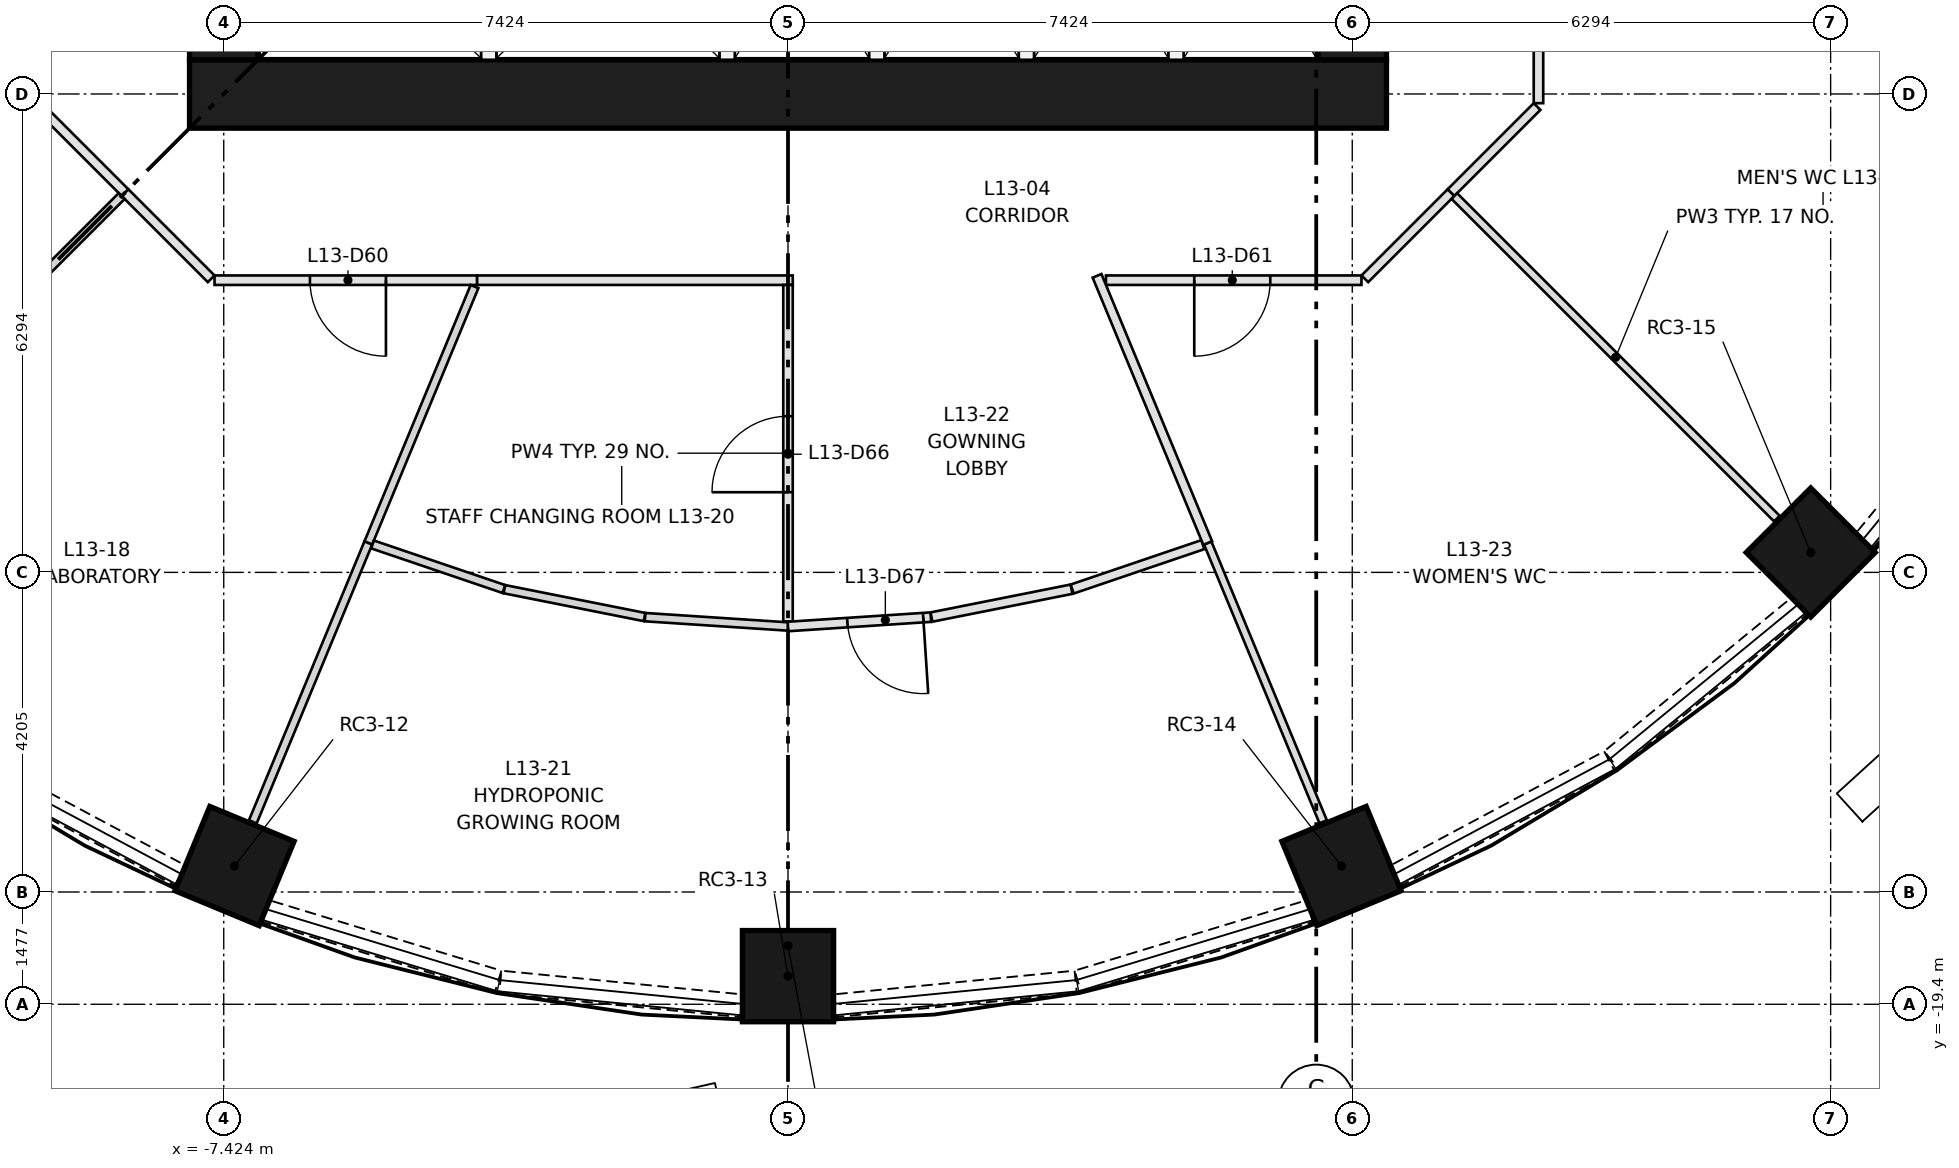
"""IFC4 building model, lengths in metres.
Left out: names, types, materials, properties, quantities, classifications, styles, units other than length and angle.
Written with IfcOpenShell. Run it as: python <this file> out.ifc"""

import sys

from ifc_helpers import new_model, si_unit, direction, frame, frame_2d, origin, origin_2d, place, context, subcontext, project, spatial, rectangle, extrude, element, fill, save


model = new_model("IFC4")
c1 = context("Model", 3, precision=1e-05, world=origin(), true_north=direction((0.0, 1.0)))
c2 = subcontext(c1, "Body", "Model", "MODEL_VIEW")
j1 = project(units=[si_unit("LENGTHUNIT", "METRE"), si_unit("PLANEANGLEUNIT", "RADIAN")], contexts=[c1])
p1 = place(None, origin())
s1 = spatial("IfcSite", under=j1, at=p1, CompositionType="ELEMENT")
p2 = place(p1, origin())
s2 = spatial("IfcBuilding", under=s1, at=p2, CompositionType="ELEMENT")
p3 = place(p2, frame((0.0, 0.0, 51.75)))
s3 = spatial("IfcBuildingStorey", under=s2, at=p3, CompositionType="ELEMENT", Elevation=51.75)
for number, where, z_axis, x_axis in (
    (1, (-7.282, -17.582, 0.0), (0.0, 0.0, 1.0), (-0.383, -0.924, 0.0)),
    (2, (0.0, -19.03, 0.0), (0.0, 0.0, 1.0), (0.0, -1.0, 0.0)),
    (3, (7.282, -17.582, 0.0), (0.0, 0.0, 1.0), (0.383, -0.924, 0.0)),
    (4, (13.456, -13.456, 0.0), (0.0, 0.0, 1.0), (0.707, -0.707, 0.0)),
):
    element("IfcColumn", number, at=place(p3, frame(where, z_axis=z_axis, x_axis=x_axis)), inside=s3, PredefinedType="COLUMN", context=c2, shape_type="SweptSolid", body=[
        extrude(rectangle(XDim=1.2, YDim=1.2, at=origin_2d()), origin(), (0.0, 0.0, 1.0), 3.65),
    ])
p4 = place(p3, frame((-7.874, -7.424, 0.0), z_axis=(0.0, 0.0, 1.0), x_axis=(1.0, 0.0, 0.0)))
e5 = element("IfcWall", 5, at=p4, inside=s3, PredefinedType="SHEAR", context=c2, shape_type="SweptSolid", body=[
    extrude(rectangle(XDim=15.748, YDim=0.9, at=frame_2d((7.874, 0.0))), origin(), (0.0, 0.0, 1.0), 3.65),
])
p5 = place(p3, frame((-7.424, -6.974, 0.0), z_axis=(0.0, 0.0, 1.0), x_axis=(0.0, 1.0, 0.0)))
e6 = element("IfcWall", 6, at=p5, inside=s3, PredefinedType="SHEAR", context=c2, shape_type="SweptSolid", body=[
    extrude(rectangle(XDim=13.948, YDim=0.9, at=frame_2d((6.974, 0.0))), origin(), (0.0, 0.0, 1.0), 3.65),
])
p6 = place(p5, frame((6.474, 0.0, 0.0)))
e7 = element("IfcOpeningElement", 7, at=p6, cuts=e6, PredefinedType="OPENING", context=c2, shape_type="SweptSolid", body=[
    extrude(rectangle(XDim=1.0, YDim=2.1, at=frame_2d((0.5, 1.05))), frame((0.0, 0.46, 0.0), z_axis=(0.0, -1.0, 0.0), x_axis=(1.0, 0.0, 0.0)), (0.0, 0.0, 1.0), 0.92),
])
p7 = place(p5, frame((3.35, 0.0, 0.0)))
e8 = element("IfcOpeningElement", 8, at=p7, cuts=e6, PredefinedType="OPENING", context=c2, shape_type="SweptSolid", body=[
    extrude(rectangle(XDim=1.8, YDim=2.1, at=frame_2d((0.9, 1.05))), frame((0.0, 0.46, 0.0), z_axis=(0.0, -1.0, 0.0), x_axis=(1.0, 0.0, 0.0)), (0.0, 0.0, 1.0), 0.92),
])
p8 = place(p5, frame((8.799, 0.0, 0.0)))
e9 = element("IfcOpeningElement", 9, at=p8, cuts=e6, PredefinedType="OPENING", context=c2, shape_type="SweptSolid", body=[
    extrude(rectangle(XDim=1.8, YDim=2.1, at=frame_2d((0.9, 1.05))), frame((0.0, 0.46, 0.0), z_axis=(0.0, -1.0, 0.0), x_axis=(1.0, 0.0, 0.0)), (0.0, 0.0, 1.0), 0.92),
])
p9 = place(p5, frame((11.974, 0.0, 0.0)))
e10 = element("IfcOpeningElement", 10, at=p9, cuts=e6, PredefinedType="OPENING", context=c2, shape_type="SweptSolid", body=[
    extrude(rectangle(XDim=1.0, YDim=2.1, at=frame_2d((0.5, 1.05))), frame((0.0, 0.46, 0.0), z_axis=(0.0, -1.0, 0.0), x_axis=(1.0, 0.0, 0.0)), (0.0, 0.0, 1.0), 0.92),
])
p10 = place(p3, frame((7.424, -6.974, 0.0), z_axis=(0.0, 0.0, 1.0), x_axis=(0.0, 1.0, 0.0)))
e11 = element("IfcWall", 11, at=p10, inside=s3, PredefinedType="SHEAR", context=c2, shape_type="SweptSolid", body=[
    extrude(rectangle(XDim=13.948, YDim=0.9, at=frame_2d((6.974, 0.0))), origin(), (0.0, 0.0, 1.0), 3.65),
])
p11 = place(p10, frame((6.474, 0.0, 0.0)))
e12 = element("IfcOpeningElement", 12, at=p11, cuts=e11, PredefinedType="OPENING", context=c2, shape_type="SweptSolid", body=[
    extrude(rectangle(XDim=1.0, YDim=2.1, at=frame_2d((0.5, 1.05))), frame((0.0, 0.46, 0.0), z_axis=(0.0, -1.0, 0.0), x_axis=(1.0, 0.0, 0.0)), (0.0, 0.0, 1.0), 0.92),
])
p12 = place(p10, frame((3.35, 0.0, 0.0)))
e13 = element("IfcOpeningElement", 13, at=p12, cuts=e11, PredefinedType="OPENING", context=c2, shape_type="SweptSolid", body=[
    extrude(rectangle(XDim=1.8, YDim=2.1, at=frame_2d((0.9, 1.05))), frame((0.0, 0.46, 0.0), z_axis=(0.0, -1.0, 0.0), x_axis=(1.0, 0.0, 0.0)), (0.0, 0.0, 1.0), 0.92),
])
p13 = place(p10, frame((8.799, 0.0, 0.0)))
e14 = element("IfcOpeningElement", 14, at=p13, cuts=e11, PredefinedType="OPENING", context=c2, shape_type="SweptSolid", body=[
    extrude(rectangle(XDim=1.8, YDim=2.1, at=frame_2d((0.9, 1.05))), frame((0.0, 0.46, 0.0), z_axis=(0.0, -1.0, 0.0), x_axis=(1.0, 0.0, 0.0)), (0.0, 0.0, 1.0), 0.92),
])
for number, where, z_axis, x_axis in (
    (15, (-3.937, -6.974, 0.0), (0.0, 0.0, 1.0), (0.0, 1.0, 0.0)),
    (16, (-0.8, -6.974, 0.0), (0.0, 0.0, 1.0), (0.0, 1.0, 0.0)),
    (17, (1.168, -6.974, 0.0), (0.0, 0.0, 1.0), (0.0, 1.0, 0.0)),
    (18, (3.137, -6.974, 0.0), (0.0, 0.0, 1.0), (0.0, 1.0, 0.0)),
    (19, (5.105, -6.974, 0.0), (0.0, 0.0, 1.0), (0.0, 1.0, 0.0)),
):
    element("IfcWall", number, at=place(p3, frame(where, z_axis=z_axis, x_axis=x_axis)), inside=s3, PredefinedType="PARTITIONING", context=c2, shape_type="SweptSolid", body=[
        extrude(rectangle(XDim=2.8, YDim=0.2, at=frame_2d((1.4, 0.0))), origin(), (0.0, 0.0, 1.0), 3.3),
    ])
p14 = place(p3, frame((-10.809, -16.204, 0.0), z_axis=(0.0, 0.0, 1.0), x_axis=(0.881994263934, -0.471260138764, 0.0)))
e20 = element("IfcWall", 20, at=p14, inside=s3, PredefinedType="SOLIDWALL", context=c2, shape_type="SweptSolid", body=[
    extrude(rectangle(XDim=3.187, YDim=0.3, at=frame_2d((1.593, 0.0))), origin(), (0.0, 0.0, 1.0), 0.9),
])
p15 = place(p3, frame((-6.865, -18.175, 0.0), z_axis=(0.0, 0.0, 1.0), x_axis=(0.956849017819, -0.290585541792, 0.0)))
e21 = element("IfcWall", 21, at=p15, inside=s3, PredefinedType="SOLIDWALL", context=c2, shape_type="SweptSolid", body=[
    extrude(rectangle(XDim=3.188, YDim=0.3, at=frame_2d((1.594, 0.0))), origin(), (0.0, 0.0, 1.0), 0.9),
])
for number, where, z_axis, x_axis in (
    (22, (-3.785, -19.107, 0.0), (0.0, 0.0, 1.0), (0.995, -0.098, 0.0)),
    (23, (0.613, -19.419, 0.0), (0.0, 0.0, 1.0), (0.995, 0.098, 0.0)),
):
    element("IfcWall", number, at=place(p3, frame(where, z_axis=z_axis, x_axis=x_axis)), inside=s3, PredefinedType="SOLIDWALL", context=c2, shape_type="SweptSolid", body=[
        extrude(rectangle(XDim=3.188, YDim=0.3, at=frame_2d((1.594, 0.0))), origin(), (0.0, 0.0, 1.0), 0.9),
    ])
p16 = place(p3, frame((3.814, -19.102, 0.0), z_axis=(0.0, 0.0, 1.0), x_axis=(0.956849017819, 0.290585541792, 0.0)))
e24 = element("IfcWall", 24, at=p16, inside=s3, PredefinedType="SOLIDWALL", context=c2, shape_type="SweptSolid", body=[
    extrude(rectangle(XDim=3.188, YDim=0.3, at=frame_2d((1.594, 0.0))), origin(), (0.0, 0.0, 1.0), 0.9),
])
p17 = place(p3, frame((7.998, -17.706, 0.0), z_axis=(0.0, 0.0, 1.0), x_axis=(0.881994263934, 0.471260138764, 0.0)))
e25 = element("IfcWall", 25, at=p17, inside=s3, PredefinedType="SOLIDWALL", context=c2, shape_type="SweptSolid", body=[
    extrude(rectangle(XDim=3.187, YDim=0.3, at=frame_2d((1.593, 0.0))), origin(), (0.0, 0.0, 1.0), 0.9),
])
for number, where, z_axis, x_axis in (
    (26, (10.833, -16.188, 0.0), (0.0, 0.0, 1.0), (0.773, 0.634, 0.0)),
    (27, (14.166, -13.298, 0.0), (0.0, 0.0, 1.0), (0.634, 0.773, 0.0)),
):
    element("IfcWall", number, at=place(p3, frame(where, z_axis=z_axis, x_axis=x_axis)), inside=s3, PredefinedType="SOLIDWALL", context=c2, shape_type="SweptSolid", body=[
        extrude(rectangle(XDim=3.188, YDim=0.3, at=frame_2d((1.594, 0.0))), origin(), (0.0, 0.0, 1.0), 0.9),
    ])
p18 = place(p3, frame((9.856, -7.589, 0.0), z_axis=(0.0, 0.0, 1.0), x_axis=(-0.70718294931, -0.707030604857, 0.0)))
e28 = element("IfcWall", 28, at=p18, inside=s3, PredefinedType="PARTITIONING", context=c2, shape_type="SweptSolid", body=[
    extrude(rectangle(XDim=1.603, YDim=0.125, at=frame_2d((0.801, 0.0))), origin(), (0.0, 0.0, 1.0), 3.3),
])
p19 = place(p3, frame((9.874, -4.09, 0.0), z_axis=(0.0, 0.0, 1.0), x_axis=(0.0, -1.0, 0.0)))
e29 = element("IfcWall", 29, at=p19, inside=s3, PredefinedType="PARTITIONING", context=c2, shape_type="SweptSolid", body=[
    extrude(rectangle(XDim=3.455, YDim=0.125, at=frame_2d((1.728, 0.0))), origin(), (0.0, 0.0, 1.0), 3.3),
])
p20 = place(p19, frame((1.2, 0.0, 0.0)))
e30 = element("IfcOpeningElement", 30, at=p20, cuts=e29, PredefinedType="OPENING", context=c2, shape_type="SweptSolid", body=[
    extrude(rectangle(XDim=1.0, YDim=2.1, at=frame_2d((0.5, 1.05))), frame((0.0, 0.073, 0.0), z_axis=(0.0, -1.0, 0.0), x_axis=(1.0, 0.0, 0.0)), (0.0, 0.0, 1.0), 0.145),
])
for number, where, z_axis, x_axis in (
    (31, (-8.722, -8.722, 0.0), (0.0, 0.0, 1.0), (-0.707, 0.707, 0.0)),
    (32, (-7.589, -9.856, 0.0), (0.0, 0.0, 1.0), (-0.707, 0.707, 0.0)),
):
    element("IfcWall", number, at=place(p3, frame(where, z_axis=z_axis, x_axis=x_axis)), inside=s3, PredefinedType="PARTITIONING", context=c2, shape_type="SweptSolid", body=[
        extrude(rectangle(XDim=1.603, YDim=0.125, at=frame_2d((0.801, 0.0))), origin(), (0.0, 0.0, 1.0), 3.3),
    ])
p21 = place(p3, frame((-4.09, -9.874, 0.0), z_axis=(0.0, 0.0, 1.0), x_axis=(-1.0, 0.0, 0.0)))
e33 = element("IfcWall", 33, at=p21, inside=s3, PredefinedType="PARTITIONING", context=c2, shape_type="SweptSolid", body=[
    extrude(rectangle(XDim=3.455, YDim=0.125, at=frame_2d((1.728, 0.0))), origin(), (0.0, 0.0, 1.0), 3.3),
])
p22 = place(p21, frame((1.2, 0.0, 0.0)))
e34 = element("IfcOpeningElement", 34, at=p22, cuts=e33, PredefinedType="OPENING", context=c2, shape_type="SweptSolid", body=[
    extrude(rectangle(XDim=1.0, YDim=2.1, at=frame_2d((0.5, 1.05))), frame((0.0, 0.073, 0.0), z_axis=(0.0, -1.0, 0.0), x_axis=(1.0, 0.0, 0.0)), (0.0, 0.0, 1.0), 0.145),
])
p23 = place(p3, frame((0.062, -9.874, 0.0), z_axis=(0.0, 0.0, 1.0), x_axis=(-1.0, 0.0, 0.0)))
e35 = element("IfcWall", 35, at=p23, inside=s3, PredefinedType="PARTITIONING", context=c2, shape_type="SweptSolid", body=[
    extrude(rectangle(XDim=4.152, YDim=0.125, at=frame_2d((2.076, 0.0))), origin(), (0.0, 0.0, 1.0), 3.3),
])
p24 = place(p3, frame((7.545, -9.874, 0.0), z_axis=(0.0, 0.0, 1.0), x_axis=(-1.0, 0.0, 0.0)))
e36 = element("IfcWall", 36, at=p24, inside=s3, PredefinedType="PARTITIONING", context=c2, shape_type="SweptSolid", body=[
    extrude(rectangle(XDim=3.362, YDim=0.125, at=frame_2d((1.681, 0.0))), origin(), (0.0, 0.0, 1.0), 3.3),
])
p25 = place(p24, frame((1.2, 0.0, 0.0)))
e37 = element("IfcOpeningElement", 37, at=p25, cuts=e36, PredefinedType="OPENING", context=c2, shape_type="SweptSolid", body=[
    extrude(rectangle(XDim=1.0, YDim=2.1, at=frame_2d((0.5, 1.05))), frame((0.0, 0.073, 0.0), z_axis=(0.0, -1.0, 0.0), x_axis=(1.0, 0.0, 0.0)), (0.0, 0.0, 1.0), 0.145),
])
p26 = place(p3, frame((8.722, -8.722, 0.0), z_axis=(0.0, 0.0, 1.0), x_axis=(-0.707030604857, -0.70718294931, 0.0)))
e38 = element("IfcWall", 38, at=p26, inside=s3, PredefinedType="PARTITIONING", context=c2, shape_type="SweptSolid", body=[
    extrude(rectangle(XDim=1.603, YDim=0.125, at=frame_2d((0.801, 0.0))), origin(), (0.0, 0.0, 1.0), 3.3),
])
p27 = place(p3, frame((17.0, -7.042, 0.0), z_axis=(0.0, 0.0, 1.0), x_axis=(-0.923870076355, 0.382706260748, 0.0)))
e39 = element("IfcWall", 39, at=p27, inside=s3, PredefinedType="PARTITIONING", context=c2, shape_type="SweptSolid", body=[
    extrude(rectangle(XDim=3.67, YDim=0.105, at=frame_2d((1.835, 0.0))), origin(), (0.0, 0.0, 1.0), 3.3),
])
p28 = place(p3, frame((-13.011, -13.011, 0.0), z_axis=(0.0, 0.0, 1.0), x_axis=(0.707106781187, 0.707106781187, 0.0)))
e40 = element("IfcWall", 40, at=p28, inside=s3, PredefinedType="PARTITIONING", context=c2, shape_type="SweptSolid", body=[
    extrude(rectangle(XDim=6.002, YDim=0.11, at=frame_2d((3.001, 0.0))), origin(), (0.0, 0.0, 1.0), 3.3),
])
p29 = place(p3, frame((-4.125, -9.958, 0.0), z_axis=(0.0, 0.0, 1.0), x_axis=(-0.382715874613, -0.923866093825, 0.0)))
e41 = element("IfcWall", 41, at=p29, inside=s3, PredefinedType="PARTITIONING", context=c2, shape_type="SweptSolid", body=[
    extrude(rectangle(XDim=3.652, YDim=0.11, at=frame_2d((1.826, 0.0))), origin(), (0.0, 0.0, 1.0), 3.3),
])
p30 = place(p3, frame((-5.522, -13.332, 0.0), z_axis=(0.0, 0.0, 1.0), x_axis=(-0.382675844596, -0.923882675432, 0.0)))
e42 = element("IfcWall", 42, at=p30, inside=s3, PredefinedType="PARTITIONING", context=c2, shape_type="SweptSolid", body=[
    extrude(rectangle(XDim=3.97, YDim=0.11, at=frame_2d((1.985, 0.0))), origin(), (0.0, 0.0, 1.0), 3.3),
])
p31 = place(p3, frame((-3.738, -13.937, 0.0), z_axis=(0.0, 0.0, 1.0), x_axis=(-0.94697070508, 0.321319908688, 0.0)))
e43 = element("IfcWall", 43, at=p31, inside=s3, PredefinedType="PARTITIONING", context=c2, shape_type="SweptSolid", body=[
    extrude(rectangle(XDim=1.825, YDim=0.11, at=frame_2d((0.913, 0.0))), origin(), (0.0, 0.0, 1.0), 3.3),
])
p32 = place(p3, frame((-1.887, -14.306, 0.0), z_axis=(0.0, 0.0, 1.0), x_axis=(-0.980774944963, 0.195142274593, 0.0)))
e44 = element("IfcWall", 44, at=p32, inside=s3, PredefinedType="PARTITIONING", context=c2, shape_type="SweptSolid", body=[
    extrude(rectangle(XDim=1.88, YDim=0.11, at=frame_2d((0.94, 0.0))), origin(), (0.0, 0.0, 1.0), 3.3),
])
p33 = place(p3, frame((0.0, -14.43, 0.0), z_axis=(0.0, 0.0, 1.0), x_axis=(-0.997856255434, 0.06544381935, 0.0)))
e45 = element("IfcWall", 45, at=p33, inside=s3, PredefinedType="PARTITIONING", context=c2, shape_type="SweptSolid", body=[
    extrude(rectangle(XDim=1.884, YDim=0.11, at=frame_2d((0.942, 0.0))), origin(), (0.0, 0.0, 1.0), 3.3),
])
p34 = place(p3, frame((0.0, -14.363, 0.0), z_axis=(0.0, 0.0, 1.0), x_axis=(0.0, 1.0, 0.0)))
e46 = element("IfcWall", 46, at=p34, inside=s3, PredefinedType="PARTITIONING", context=c2, shape_type="SweptSolid", body=[
    extrude(rectangle(XDim=4.427, YDim=0.125, at=frame_2d((2.213, 0.0))), origin(), (0.0, 0.0, 1.0), 3.3),
])
p35 = place(p34, frame((1.7, 0.0, 0.0)))
e47 = element("IfcOpeningElement", 47, at=p35, cuts=e46, PredefinedType="OPENING", context=c2, shape_type="SweptSolid", body=[
    extrude(rectangle(XDim=1.0, YDim=2.1, at=frame_2d((0.5, 1.05))), frame((0.0, 0.073, 0.0), z_axis=(0.0, -1.0, 0.0), x_axis=(1.0, 0.0, 0.0)), (0.0, 0.0, 1.0), 0.145),
])
p36 = place(p3, frame((1.879, -14.307, 0.0), z_axis=(0.0, 0.0, 1.0), x_axis=(-0.997863603838, -0.065331677882, 0.0)))
e48 = element("IfcWall", 48, at=p36, inside=s3, PredefinedType="PARTITIONING", context=c2, shape_type="SweptSolid", body=[
    extrude(rectangle(XDim=1.883, YDim=0.125, at=frame_2d((0.942, 0.0))), origin(), (0.0, 0.0, 1.0), 3.3),
])
p37 = place(p36, frame((0.1, 0.0, 0.0)))
e49 = element("IfcOpeningElement", 49, at=p37, cuts=e48, PredefinedType="OPENING", context=c2, shape_type="SweptSolid", body=[
    extrude(rectangle(XDim=1.0, YDim=2.1, at=frame_2d((0.5, 1.05))), frame((0.0, 0.073, 0.0), z_axis=(0.0, -1.0, 0.0), x_axis=(1.0, 0.0, 0.0)), (0.0, 0.0, 1.0), 0.145),
])
p38 = place(p3, frame((1.887, -14.306, 0.0), z_axis=(0.0, 0.0, 1.0), x_axis=(0.980804871908, 0.194991803011, 0.0)))
e50 = element("IfcWall", 50, at=p38, inside=s3, PredefinedType="PARTITIONING", context=c2, shape_type="SweptSolid", body=[
    extrude(rectangle(XDim=1.879, YDim=0.125, at=frame_2d((0.94, 0.0))), origin(), (0.0, 0.0, 1.0), 3.3),
])
p39 = place(p3, frame((3.739, -13.937, 0.0), z_axis=(0.0, 0.0, 1.0), x_axis=(0.946921731465, 0.32146420404, 0.0)))
e51 = element("IfcWall", 51, at=p39, inside=s3, PredefinedType="PARTITIONING", context=c2, shape_type="SweptSolid", body=[
    extrude(rectangle(XDim=1.817, YDim=0.125, at=frame_2d((0.908, 0.0))), origin(), (0.0, 0.0, 1.0), 3.3),
])
p40 = place(p3, frame((5.522, -13.332, 0.0), z_axis=(0.0, 0.0, 1.0), x_axis=(0.382675844596, -0.923882675432, 0.0)))
e52 = element("IfcWall", 52, at=p40, inside=s3, PredefinedType="PARTITIONING", context=c2, shape_type="SweptSolid", body=[
    extrude(rectangle(XDim=3.97, YDim=0.105, at=frame_2d((1.985, 0.0))), origin(), (0.0, 0.0, 1.0), 3.3),
])
p41 = place(p3, frame((4.066, -9.816, 0.0), z_axis=(0.0, 0.0, 1.0), x_axis=(0.382746586719, -0.923853370592, 0.0)))
e53 = element("IfcWall", 53, at=p41, inside=s3, PredefinedType="PARTITIONING", context=c2, shape_type="SweptSolid", body=[
    extrude(rectangle(XDim=3.805, YDim=0.125, at=frame_2d((1.902, 0.0))), origin(), (0.0, 0.0, 1.0), 3.3),
])
p42 = place(p3, frame((8.767, -8.767, 0.0), z_axis=(0.0, 0.0, 1.0), x_axis=(0.707106781187, -0.707106781187, 0.0)))
e54 = element("IfcWall", 54, at=p42, inside=s3, PredefinedType="PARTITIONING", context=c2, shape_type="SweptSolid", body=[
    extrude(rectangle(XDim=6.002, YDim=0.105, at=frame_2d((3.001, 0.0))), origin(), (0.0, 0.0, 1.0), 3.3),
])
p43 = place(p22, origin())
e55 = element("IfcDoor", 55, at=p43, inside=s3, OperationType="SINGLE_SWING_LEFT", PredefinedType="DOOR", context=c2, shape_type="SweptSolid", body=[
    extrude(rectangle(XDim=1.0, YDim=2.1, at=frame_2d((0.5, 1.05))), frame((0.0, 0.025, 0.0), z_axis=(0.0, -1.0, 0.0), x_axis=(1.0, 0.0, 0.0)), (0.0, 0.0, 1.0), 0.05),
])
fill(e34, e55)
p44 = place(p25, origin())
e56 = element("IfcDoor", 56, at=p44, inside=s3, OperationType="SINGLE_SWING_RIGHT", PredefinedType="DOOR", context=c2, shape_type="SweptSolid", body=[
    extrude(rectangle(XDim=1.0, YDim=2.1, at=frame_2d((0.5, 1.05))), frame((0.0, 0.025, 0.0), z_axis=(0.0, -1.0, 0.0), x_axis=(1.0, 0.0, 0.0)), (0.0, 0.0, 1.0), 0.05),
])
fill(e37, e56)
p45 = place(p35, origin())
e57 = element("IfcDoor", 57, at=p45, inside=s3, OperationType="SINGLE_SWING_LEFT", PredefinedType="DOOR", context=c2, shape_type="SweptSolid", body=[
    extrude(rectangle(XDim=1.0, YDim=2.1, at=frame_2d((0.5, 1.05))), frame((0.0, 0.025, 0.0), z_axis=(0.0, -1.0, 0.0), x_axis=(1.0, 0.0, 0.0)), (0.0, 0.0, 1.0), 0.05),
])
fill(e47, e57)
p46 = place(p37, origin())
e58 = element("IfcDoor", 58, at=p46, inside=s3, OperationType="SINGLE_SWING_LEFT", PredefinedType="DOOR", context=c2, shape_type="SweptSolid", body=[
    extrude(rectangle(XDim=1.0, YDim=2.1, at=frame_2d((0.5, 1.05))), frame((0.0, 0.025, 0.0), z_axis=(0.0, -1.0, 0.0), x_axis=(1.0, 0.0, 0.0)), (0.0, 0.0, 1.0), 0.05),
])
fill(e49, e58)
save(model, sys.argv[1])
